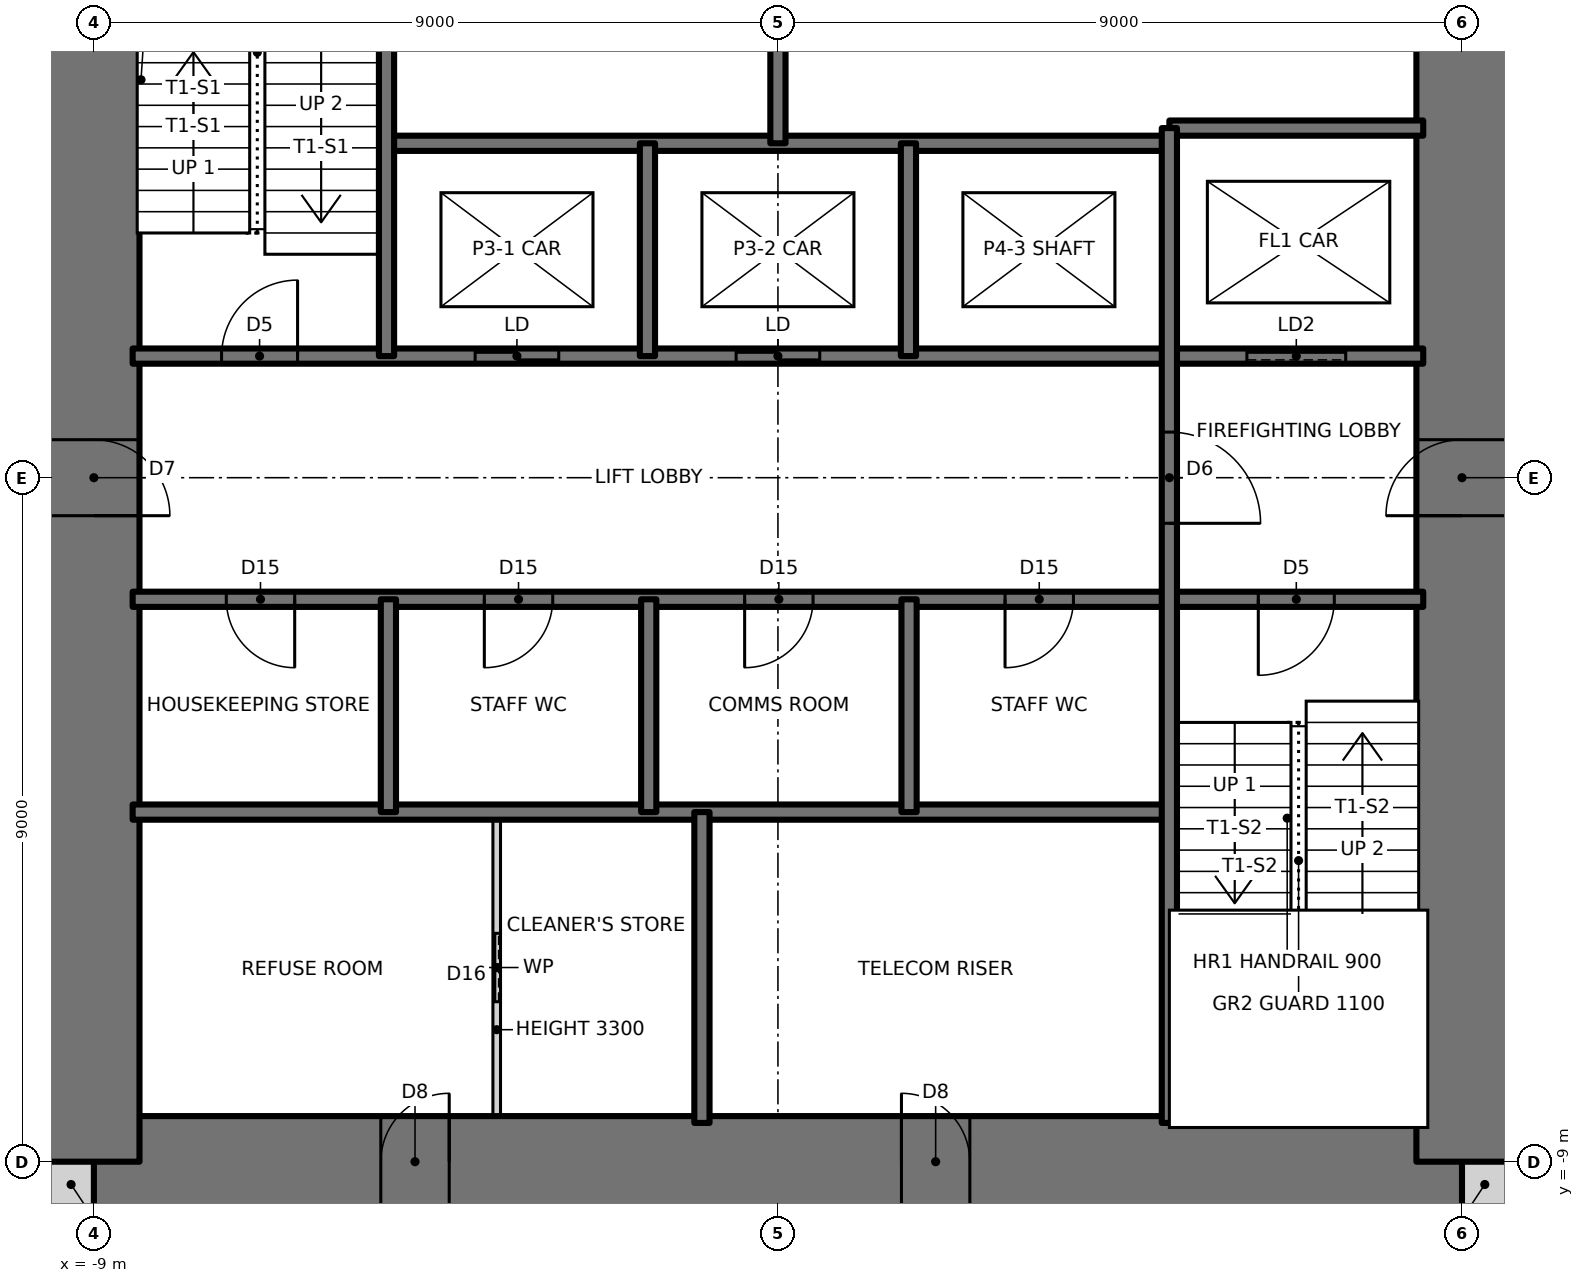
"""IFC4 building model, lengths in metres.
Left out: names, types, materials, properties, quantities, classifications, styles, units other than length and angle.
Written with IfcOpenShell. Run it as: python <this file> out.ifc"""

import sys

from ifc_helpers import new_model, si_unit, direction, frame, frame_2d, origin, place, context, subcontext, project, spatial, rectangle, extrude, element, fill, save


model = new_model("IFC4")
c1 = context("Model", 3, precision=1e-05, world=origin(), true_north=direction((0.0, 1.0)))
c2 = subcontext(c1, "Body", "Model", "MODEL_VIEW")
j1 = project(units=[si_unit("LENGTHUNIT", "METRE"), si_unit("PLANEANGLEUNIT", "RADIAN")], contexts=[c1])
p1 = place(None, origin())
s1 = spatial("IfcSite", under=j1, at=p1, CompositionType="ELEMENT")
p2 = place(p1, origin())
s2 = spatial("IfcBuilding", under=s1, at=p2, CompositionType="ELEMENT")
p3 = place(p2, frame((0.0, 0.0, 191.5)))
s3 = spatial("IfcBuildingStorey", under=s2, at=p3, CompositionType="ELEMENT", Elevation=191.5)
for number, where, z_axis, x_axis in (
    (1, (-9.6, -9.3, 0.0), (0.0, 0.0, 1.0), (1.0, 0.0, 0.0)),
    (2, (9.0, -9.3, 0.0), (0.0, 0.0, 1.0), (1.0, 0.0, 0.0)),
):
    element("IfcWall", number, at=place(p3, frame(where, z_axis=z_axis, x_axis=x_axis)), inside=s3, PredefinedType="SOLIDWALL", context=c2, shape_type="SweptSolid", body=[
        extrude(rectangle(XDim=0.6, YDim=0.6, at=frame_2d((0.3, 0.0))), origin(), (0.0, 0.0, 1.0), 3.5),
    ])
p4 = place(p3, frame((-9.0, -9.0, 0.0), z_axis=(0.0, 0.0, 1.0), x_axis=(1.0, 0.0, 0.0)))
e3 = element("IfcWall", 3, at=p4, inside=s3, PredefinedType="SHEAR", context=c2, shape_type="SweptSolid", body=[
    extrude(rectangle(XDim=18.0, YDim=1.2, at=frame_2d((9.0, 0.0))), origin(), (0.0, 0.0, 1.0), 3.5),
])
p5 = place(p4, frame((3.775, 0.0, 0.0)))
e4 = element("IfcOpeningElement", 4, at=p5, cuts=e3, PredefinedType="OPENING", context=c2, shape_type="SweptSolid", body=[
    extrude(rectangle(XDim=0.9, YDim=2.1, at=frame_2d((0.45, 1.05))), frame((0.0, 0.61, 0.0), z_axis=(0.0, -1.0, 0.0), x_axis=(1.0, 0.0, 0.0)), (0.0, 0.0, 1.0), 1.22),
])
p6 = place(p4, frame((10.625, 0.0, 0.0)))
e5 = element("IfcOpeningElement", 5, at=p6, cuts=e3, PredefinedType="OPENING", context=c2, shape_type="SweptSolid", body=[
    extrude(rectangle(XDim=0.9, YDim=2.1, at=frame_2d((0.45, 1.05))), frame((0.0, 0.61, 0.0), z_axis=(0.0, -1.0, 0.0), x_axis=(1.0, 0.0, 0.0)), (0.0, 0.0, 1.0), 1.22),
])
p7 = place(p3, frame((9.0, -9.0, 0.0), z_axis=(0.0, 0.0, 1.0), x_axis=(0.0, 1.0, 0.0)))
e6 = element("IfcWall", 6, at=p7, inside=s3, PredefinedType="SHEAR", context=c2, shape_type="SweptSolid", body=[
    extrude(rectangle(XDim=18.0, YDim=1.2, at=frame_2d((9.0, 0.0))), origin(), (0.0, 0.0, 1.0), 3.5),
])
p8 = place(p7, frame((8.5, 0.0, 0.0)))
e7 = element("IfcOpeningElement", 7, at=p8, cuts=e6, PredefinedType="OPENING", context=c2, shape_type="SweptSolid", body=[
    extrude(rectangle(XDim=1.0, YDim=2.1, at=frame_2d((0.5, 1.05))), frame((0.0, 0.61, 0.0), z_axis=(0.0, -1.0, 0.0), x_axis=(1.0, 0.0, 0.0)), (0.0, 0.0, 1.0), 1.22),
])
p9 = place(p3, frame((-9.0, 9.0, 0.0), z_axis=(0.0, 0.0, 1.0), x_axis=(0.0, -1.0, 0.0)))
e8 = element("IfcWall", 8, at=p9, inside=s3, PredefinedType="SHEAR", context=c2, shape_type="SweptSolid", body=[
    extrude(rectangle(XDim=18.0, YDim=1.2, at=frame_2d((9.0, 0.0))), origin(), (0.0, 0.0, 1.0), 3.5),
])
p10 = place(p9, frame((8.5, 0.0, 0.0)))
e9 = element("IfcOpeningElement", 9, at=p10, cuts=e8, PredefinedType="OPENING", context=c2, shape_type="SweptSolid", body=[
    extrude(rectangle(XDim=1.0, YDim=2.1, at=frame_2d((0.5, 1.05))), frame((0.0, 0.61, 0.0), z_axis=(0.0, -1.0, 0.0), x_axis=(1.0, 0.0, 0.0)), (0.0, 0.0, 1.0), 1.22),
])
p11 = place(p3, frame((-8.49, -4.4, 0.0), z_axis=(0.0, 0.0, 1.0), x_axis=(1.0, 0.0, 0.0)))
e10 = element("IfcWall", 10, at=p11, inside=s3, PredefinedType="SOLIDWALL", context=c2, shape_type="SweptSolid", body=[
    extrude(rectangle(XDim=13.64, YDim=0.2, at=frame_2d((6.82, 0.0))), origin(), (0.0, 0.0, 1.0), 3.5),
])
p12 = place(p3, frame((-8.49, -1.6, 0.0), z_axis=(0.0, 0.0, 1.0), x_axis=(1.0, 0.0, 0.0)))
e11 = element("IfcWall", 11, at=p12, inside=s3, PredefinedType="SOLIDWALL", context=c2, shape_type="SweptSolid", body=[
    extrude(rectangle(XDim=16.98, YDim=0.2, at=frame_2d((8.49, 0.0))), origin(), (0.0, 0.0, 1.0), 3.5),
])
p13 = place(p12, frame((14.81, 0.0, 0.0)))
e12 = element("IfcOpeningElement", 12, at=p13, cuts=e11, PredefinedType="OPENING", context=c2, shape_type="SweptSolid", body=[
    extrude(rectangle(XDim=1.0, YDim=2.1, at=frame_2d((0.5, 1.05))), frame((0.0, 0.11, 0.0), z_axis=(0.0, -1.0, 0.0), x_axis=(1.0, 0.0, 0.0)), (0.0, 0.0, 1.0), 0.22),
])
p14 = place(p12, frame((1.232, 0.0, 0.0)))
e13 = element("IfcOpeningElement", 13, at=p14, cuts=e11, PredefinedType="OPENING", context=c2, shape_type="SweptSolid", body=[
    extrude(rectangle(XDim=0.9, YDim=2.1, at=frame_2d((0.45, 1.05))), frame((0.0, 0.11, 0.0), z_axis=(0.0, -1.0, 0.0), x_axis=(1.0, 0.0, 0.0)), (0.0, 0.0, 1.0), 0.22),
])
p15 = place(p12, frame((4.627, 0.0, 0.0)))
e14 = element("IfcOpeningElement", 14, at=p15, cuts=e11, PredefinedType="OPENING", context=c2, shape_type="SweptSolid", body=[
    extrude(rectangle(XDim=0.9, YDim=2.1, at=frame_2d((0.45, 1.05))), frame((0.0, 0.11, 0.0), z_axis=(0.0, -1.0, 0.0), x_axis=(1.0, 0.0, 0.0)), (0.0, 0.0, 1.0), 0.22),
])
p16 = place(p12, frame((8.052, 0.0, 0.0)))
e15 = element("IfcOpeningElement", 15, at=p16, cuts=e11, PredefinedType="OPENING", context=c2, shape_type="SweptSolid", body=[
    extrude(rectangle(XDim=0.9, YDim=2.1, at=frame_2d((0.45, 1.05))), frame((0.0, 0.11, 0.0), z_axis=(0.0, -1.0, 0.0), x_axis=(1.0, 0.0, 0.0)), (0.0, 0.0, 1.0), 0.22),
])
p17 = place(p12, frame((11.478, 0.0, 0.0)))
e16 = element("IfcOpeningElement", 16, at=p17, cuts=e11, PredefinedType="OPENING", context=c2, shape_type="SweptSolid", body=[
    extrude(rectangle(XDim=0.9, YDim=2.1, at=frame_2d((0.45, 1.05))), frame((0.0, 0.11, 0.0), z_axis=(0.0, -1.0, 0.0), x_axis=(1.0, 0.0, 0.0)), (0.0, 0.0, 1.0), 0.22),
])
p18 = place(p3, frame((-8.49, 1.6, 0.0), z_axis=(0.0, 0.0, 1.0), x_axis=(1.0, 0.0, 0.0)))
e17 = element("IfcWall", 17, at=p18, inside=s3, PredefinedType="SOLIDWALL", context=c2, shape_type="SweptSolid", body=[
    extrude(rectangle(XDim=16.98, YDim=0.2, at=frame_2d((8.49, 0.0))), origin(), (0.0, 0.0, 1.0), 3.5),
])
p19 = place(p18, frame((1.17, 0.0, 0.0)))
e18 = element("IfcOpeningElement", 18, at=p19, cuts=e17, PredefinedType="OPENING", context=c2, shape_type="SweptSolid", body=[
    extrude(rectangle(XDim=1.0, YDim=2.1, at=frame_2d((0.5, 1.05))), frame((0.0, 0.11, 0.0), z_axis=(0.0, -1.0, 0.0), x_axis=(1.0, 0.0, 0.0)), (0.0, 0.0, 1.0), 0.22),
])
p20 = place(p18, frame((4.506, 0.0, 0.0)))
e19 = element("IfcOpeningElement", 19, at=p20, cuts=e17, PredefinedType="OPENING", context=c2, shape_type="SweptSolid", body=[
    extrude(rectangle(XDim=1.1, YDim=2.1, at=frame_2d((0.55, 1.05))), frame((0.0, 0.11, 0.0), z_axis=(0.0, -1.0, 0.0), x_axis=(1.0, 0.0, 0.0)), (0.0, 0.0, 1.0), 0.22),
])
p21 = place(p18, frame((7.94, 0.0, 0.0)))
e20 = element("IfcOpeningElement", 20, at=p21, cuts=e17, PredefinedType="OPENING", context=c2, shape_type="SweptSolid", body=[
    extrude(rectangle(XDim=1.1, YDim=2.1, at=frame_2d((0.55, 1.05))), frame((0.0, 0.11, 0.0), z_axis=(0.0, -1.0, 0.0), x_axis=(1.0, 0.0, 0.0)), (0.0, 0.0, 1.0), 0.22),
])
p22 = place(p18, frame((14.66, 0.0, 0.0)))
e21 = element("IfcOpeningElement", 21, at=p22, cuts=e17, PredefinedType="OPENING", context=c2, shape_type="SweptSolid", body=[
    extrude(rectangle(XDim=1.3, YDim=2.1, at=frame_2d((0.65, 1.05))), frame((0.0, 0.11, 0.0), z_axis=(0.0, -1.0, 0.0), x_axis=(1.0, 0.0, 0.0)), (0.0, 0.0, 1.0), 0.22),
])
p23 = place(p3, frame((-5.15, 4.4, 0.0), z_axis=(0.0, 0.0, 1.0), x_axis=(1.0, 0.0, 0.0)))
e22 = element("IfcWall", 22, at=p23, inside=s3, PredefinedType="SOLIDWALL", context=c2, shape_type="SweptSolid", body=[
    extrude(rectangle(XDim=10.3, YDim=0.2, at=frame_2d((5.15, 0.0))), origin(), (0.0, 0.0, 1.0), 3.5),
])
p24 = place(p3, frame((5.15, 4.6, 0.0), z_axis=(0.0, 0.0, 1.0), x_axis=(1.0, 0.0, 0.0)))
e23 = element("IfcWall", 23, at=p24, inside=s3, PredefinedType="SOLIDWALL", context=c2, shape_type="SweptSolid", body=[
    extrude(rectangle(XDim=3.34, YDim=0.2, at=frame_2d((1.67, 0.0))), origin(), (0.0, 0.0, 1.0), 3.5),
])
p25 = place(p3, frame((5.15, -8.49, 0.0), z_axis=(0.0, 0.0, 1.0), x_axis=(0.0, 1.0, 0.0)))
e24 = element("IfcWall", 24, at=p25, inside=s3, PredefinedType="SOLIDWALL", context=c2, shape_type="SweptSolid", body=[
    extrude(rectangle(XDim=13.09, YDim=0.2, at=frame_2d((6.545, 0.0))), origin(), (0.0, 0.0, 1.0), 3.5),
])
p26 = place(p25, frame((7.89, 0.0, 0.0)))
e25 = element("IfcOpeningElement", 25, at=p26, cuts=e24, PredefinedType="OPENING", context=c2, shape_type="SweptSolid", body=[
    extrude(rectangle(XDim=1.2, YDim=2.1, at=frame_2d((0.6, 1.05))), frame((0.0, 0.11, 0.0), z_axis=(0.0, -1.0, 0.0), x_axis=(1.0, 0.0, 0.0)), (0.0, 0.0, 1.0), 0.22),
])
for number, where, z_axis, x_axis in (
    (26, (1.725, -4.4, 0.0), (0.0, 0.0, 1.0), (0.0, 1.0, 0.0)),
    (27, (1.717, 1.6, 0.0), (0.0, 0.0, 1.0), (0.0, 1.0, 0.0)),
):
    element("IfcWall", number, at=place(p3, frame(where, z_axis=z_axis, x_axis=x_axis)), inside=s3, PredefinedType="SOLIDWALL", context=c2, shape_type="SweptSolid", body=[
        extrude(rectangle(XDim=2.8, YDim=0.2, at=frame_2d((1.4, 0.0))), origin(), (0.0, 0.0, 1.0), 3.5),
    ])
for number, where, z_axis, x_axis in (
    (28, (0.0, 4.4, 0.0), (0.0, 0.0, 1.0), (0.0, 1.0, 0.0)),
    (29, (-1.0, -8.49, 0.0), (0.0, 0.0, 1.0), (0.0, 1.0, 0.0)),
):
    element("IfcWall", number, at=place(p3, frame(where, z_axis=z_axis, x_axis=x_axis)), inside=s3, PredefinedType="SOLIDWALL", context=c2, shape_type="SweptSolid", body=[
        extrude(rectangle(XDim=4.09, YDim=0.2, at=frame_2d((2.045, 0.0))), origin(), (0.0, 0.0, 1.0), 3.5),
    ])
for number, where, z_axis, x_axis in (
    (30, (-1.7, -4.4, 0.0), (0.0, 0.0, 1.0), (0.0, 1.0, 0.0)),
    (31, (-1.717, 1.6, 0.0), (0.0, 0.0, 1.0), (0.0, 1.0, 0.0)),
):
    element("IfcWall", number, at=place(p3, frame(where, z_axis=z_axis, x_axis=x_axis)), inside=s3, PredefinedType="SOLIDWALL", context=c2, shape_type="SweptSolid", body=[
        extrude(rectangle(XDim=2.8, YDim=0.2, at=frame_2d((1.4, 0.0))), origin(), (0.0, 0.0, 1.0), 3.5),
    ])
p27 = place(p3, frame((-3.7, -8.49, 0.0), z_axis=(0.0, 0.0, 1.0), x_axis=(0.0, 1.0, 0.0)))
e32 = element("IfcWall", 32, at=p27, inside=s3, PredefinedType="PARTITIONING", context=c2, shape_type="SweptSolid", body=[
    extrude(rectangle(XDim=4.09, YDim=0.1, at=frame_2d((2.045, 0.0))), origin(), (0.0, 0.0, 1.0), 3.3),
])
p28 = place(p27, frame((1.595, 0.0, 0.0)))
e33 = element("IfcOpeningElement", 33, at=p28, cuts=e32, PredefinedType="OPENING", context=c2, shape_type="SweptSolid", body=[
    extrude(rectangle(XDim=0.9, YDim=2.1, at=frame_2d((0.45, 1.05))), frame((0.0, 0.06, 0.0), z_axis=(0.0, -1.0, 0.0), x_axis=(1.0, 0.0, 0.0)), (0.0, 0.0, 1.0), 0.12),
])
p29 = place(p3, frame((-5.125, -4.4, 0.0), z_axis=(0.0, 0.0, 1.0), x_axis=(0.0, 1.0, 0.0)))
e34 = element("IfcWall", 34, at=p29, inside=s3, PredefinedType="SOLIDWALL", context=c2, shape_type="SweptSolid", body=[
    extrude(rectangle(XDim=2.8, YDim=0.2, at=frame_2d((1.4, 0.0))), origin(), (0.0, 0.0, 1.0), 3.5),
])
p30 = place(p3, frame((-5.15, 1.6, 0.0), z_axis=(0.0, 0.0, 1.0), x_axis=(0.0, 1.0, 0.0)))
e35 = element("IfcWall", 35, at=p30, inside=s3, PredefinedType="SOLIDWALL", context=c2, shape_type="SweptSolid", body=[
    extrude(rectangle(XDim=6.89, YDim=0.2, at=frame_2d((3.445, 0.0))), origin(), (0.0, 0.0, 1.0), 3.5),
])
p31 = place(p19, origin())
e36 = element("IfcDoor", 36, at=p31, inside=s3, OperationType="SINGLE_SWING_RIGHT", PredefinedType="DOOR", context=c2, shape_type="SweptSolid", body=[
    extrude(rectangle(XDim=1.0, YDim=2.1, at=frame_2d((0.5, 1.05))), frame((0.0, 0.025, 0.0), z_axis=(0.0, -1.0, 0.0), x_axis=(1.0, 0.0, 0.0)), (0.0, 0.0, 1.0), 0.05),
])
fill(e18, e36)
p32 = place(p13, frame((1.0, 0.0, 0.0), z_axis=(0.0, 0.0, 1.0), x_axis=(-1.0, 0.0, 0.0)))
e37 = element("IfcDoor", 37, at=p32, inside=s3, OperationType="SINGLE_SWING_RIGHT", PredefinedType="DOOR", context=c2, shape_type="SweptSolid", body=[
    extrude(rectangle(XDim=1.0, YDim=2.1, at=frame_2d((0.5, 1.05))), frame((0.0, 0.025, 0.0), z_axis=(0.0, -1.0, 0.0), x_axis=(1.0, 0.0, 0.0)), (0.0, 0.0, 1.0), 0.05),
])
fill(e12, e37)
p33 = place(p26, frame((1.2, 0.0, 0.0), z_axis=(0.0, 0.0, 1.0), x_axis=(-1.0, 0.0, 0.0)))
e38 = element("IfcDoor", 38, at=p33, inside=s3, OperationType="SINGLE_SWING_RIGHT", PredefinedType="DOOR", context=c2, shape_type="SweptSolid", body=[
    extrude(rectangle(XDim=1.2, YDim=2.1, at=frame_2d((0.6, 1.05))), frame((0.0, 0.025, 0.0), z_axis=(0.0, -1.0, 0.0), x_axis=(1.0, 0.0, 0.0)), (0.0, 0.0, 1.0), 0.05),
])
fill(e25, e38)
p34 = place(p14, frame((0.9, 0.0, 0.0), z_axis=(0.0, 0.0, 1.0), x_axis=(-1.0, 0.0, 0.0)))
e39 = element("IfcDoor", 39, at=p34, inside=s3, OperationType="SINGLE_SWING_LEFT", PredefinedType="DOOR", context=c2, shape_type="SweptSolid", body=[
    extrude(rectangle(XDim=0.9, YDim=2.1, at=frame_2d((0.45, 1.05))), frame((0.0, 0.025, 0.0), z_axis=(0.0, -1.0, 0.0), x_axis=(1.0, 0.0, 0.0)), (0.0, 0.0, 1.0), 0.05),
])
fill(e13, e39)
p35 = place(p15, frame((0.9, 0.0, 0.0), z_axis=(0.0, 0.0, 1.0), x_axis=(-1.0, 0.0, 0.0)))
e40 = element("IfcDoor", 40, at=p35, inside=s3, OperationType="SINGLE_SWING_RIGHT", PredefinedType="DOOR", context=c2, shape_type="SweptSolid", body=[
    extrude(rectangle(XDim=0.9, YDim=2.1, at=frame_2d((0.45, 1.05))), frame((0.0, 0.025, 0.0), z_axis=(0.0, -1.0, 0.0), x_axis=(1.0, 0.0, 0.0)), (0.0, 0.0, 1.0), 0.05),
])
fill(e14, e40)
p36 = place(p16, frame((0.9, 0.0, 0.0), z_axis=(0.0, 0.0, 1.0), x_axis=(-1.0, 0.0, 0.0)))
e41 = element("IfcDoor", 41, at=p36, inside=s3, OperationType="SINGLE_SWING_RIGHT", PredefinedType="DOOR", context=c2, shape_type="SweptSolid", body=[
    extrude(rectangle(XDim=0.9, YDim=2.1, at=frame_2d((0.45, 1.05))), frame((0.0, 0.025, 0.0), z_axis=(0.0, -1.0, 0.0), x_axis=(1.0, 0.0, 0.0)), (0.0, 0.0, 1.0), 0.05),
])
fill(e15, e41)
p37 = place(p17, frame((0.9, 0.0, 0.0), z_axis=(0.0, 0.0, 1.0), x_axis=(-1.0, 0.0, 0.0)))
e42 = element("IfcDoor", 42, at=p37, inside=s3, OperationType="SINGLE_SWING_RIGHT", PredefinedType="DOOR", context=c2, shape_type="SweptSolid", body=[
    extrude(rectangle(XDim=0.9, YDim=2.1, at=frame_2d((0.45, 1.05))), frame((0.0, 0.025, 0.0), z_axis=(0.0, -1.0, 0.0), x_axis=(1.0, 0.0, 0.0)), (0.0, 0.0, 1.0), 0.05),
])
fill(e16, e42)
p38 = place(p28, origin())
e43 = element("IfcDoor", 43, at=p38, inside=s3, OperationType="SLIDING_TO_LEFT", PredefinedType="DOOR", context=c2, shape_type="SweptSolid", body=[
    extrude(rectangle(XDim=0.9, YDim=2.1, at=frame_2d((0.45, 1.05))), frame((0.0, 0.025, 0.0), z_axis=(0.0, -1.0, 0.0), x_axis=(1.0, 0.0, 0.0)), (0.0, 0.0, 1.0), 0.05),
])
fill(e33, e43)
p39 = place(p10, origin())
e44 = element("IfcDoor", 44, at=p39, inside=s3, OperationType="SINGLE_SWING_RIGHT", PredefinedType="DOOR", context=c2, shape_type="SweptSolid", body=[
    extrude(rectangle(XDim=1.0, YDim=2.1, at=frame_2d((0.5, 1.05))), frame((0.0, 0.025, 0.0), z_axis=(0.0, -1.0, 0.0), x_axis=(1.0, 0.0, 0.0)), (0.0, 0.0, 1.0), 0.05),
])
fill(e9, e44)
p40 = place(p8, origin())
e45 = element("IfcDoor", 45, at=p40, inside=s3, OperationType="SINGLE_SWING_LEFT", PredefinedType="DOOR", context=c2, shape_type="SweptSolid", body=[
    extrude(rectangle(XDim=1.0, YDim=2.1, at=frame_2d((0.5, 1.05))), frame((0.0, 0.025, 0.0), z_axis=(0.0, -1.0, 0.0), x_axis=(1.0, 0.0, 0.0)), (0.0, 0.0, 1.0), 0.05),
])
fill(e7, e45)
p41 = place(p5, origin())
e46 = element("IfcDoor", 46, at=p41, inside=s3, OperationType="SINGLE_SWING_RIGHT", PredefinedType="DOOR", context=c2, shape_type="SweptSolid", body=[
    extrude(rectangle(XDim=0.9, YDim=2.1, at=frame_2d((0.45, 1.05))), frame((0.0, 0.025, 0.0), z_axis=(0.0, -1.0, 0.0), x_axis=(1.0, 0.0, 0.0)), (0.0, 0.0, 1.0), 0.05),
])
fill(e4, e46)
p42 = place(p6, origin())
e47 = element("IfcDoor", 47, at=p42, inside=s3, OperationType="SINGLE_SWING_LEFT", PredefinedType="DOOR", context=c2, shape_type="SweptSolid", body=[
    extrude(rectangle(XDim=0.9, YDim=2.1, at=frame_2d((0.45, 1.05))), frame((0.0, 0.025, 0.0), z_axis=(0.0, -1.0, 0.0), x_axis=(1.0, 0.0, 0.0)), (0.0, 0.0, 1.0), 0.05),
])
fill(e5, e47)
p43 = place(p20, origin())
e48 = element("IfcDoor", 48, at=p43, inside=s3, OperationType="DOUBLE_DOOR_SLIDING", PredefinedType="DOOR", context=c2, shape_type="SweptSolid", body=[
    extrude(rectangle(XDim=1.1, YDim=2.1, at=frame_2d((0.55, 1.05))), frame((0.0, 0.025, 0.0), z_axis=(0.0, -1.0, 0.0), x_axis=(1.0, 0.0, 0.0)), (0.0, 0.0, 1.0), 0.05),
])
fill(e19, e48)
p44 = place(p21, origin())
e49 = element("IfcDoor", 49, at=p44, inside=s3, OperationType="DOUBLE_DOOR_SLIDING", PredefinedType="DOOR", context=c2, shape_type="SweptSolid", body=[
    extrude(rectangle(XDim=1.1, YDim=2.1, at=frame_2d((0.55, 1.05))), frame((0.0, 0.025, 0.0), z_axis=(0.0, -1.0, 0.0), x_axis=(1.0, 0.0, 0.0)), (0.0, 0.0, 1.0), 0.05),
])
fill(e20, e49)
p45 = place(p22, origin())
e50 = element("IfcDoor", 50, at=p45, inside=s3, OperationType="SLIDING_TO_LEFT", PredefinedType="DOOR", context=c2, shape_type="SweptSolid", body=[
    extrude(rectangle(XDim=1.3, YDim=2.1, at=frame_2d((0.65, 1.05))), frame((0.0, 0.025, 0.0), z_axis=(0.0, -1.0, 0.0), x_axis=(1.0, 0.0, 0.0)), (0.0, 0.0, 1.0), 0.05),
])
fill(e21, e50)
save(model, sys.argv[1])
